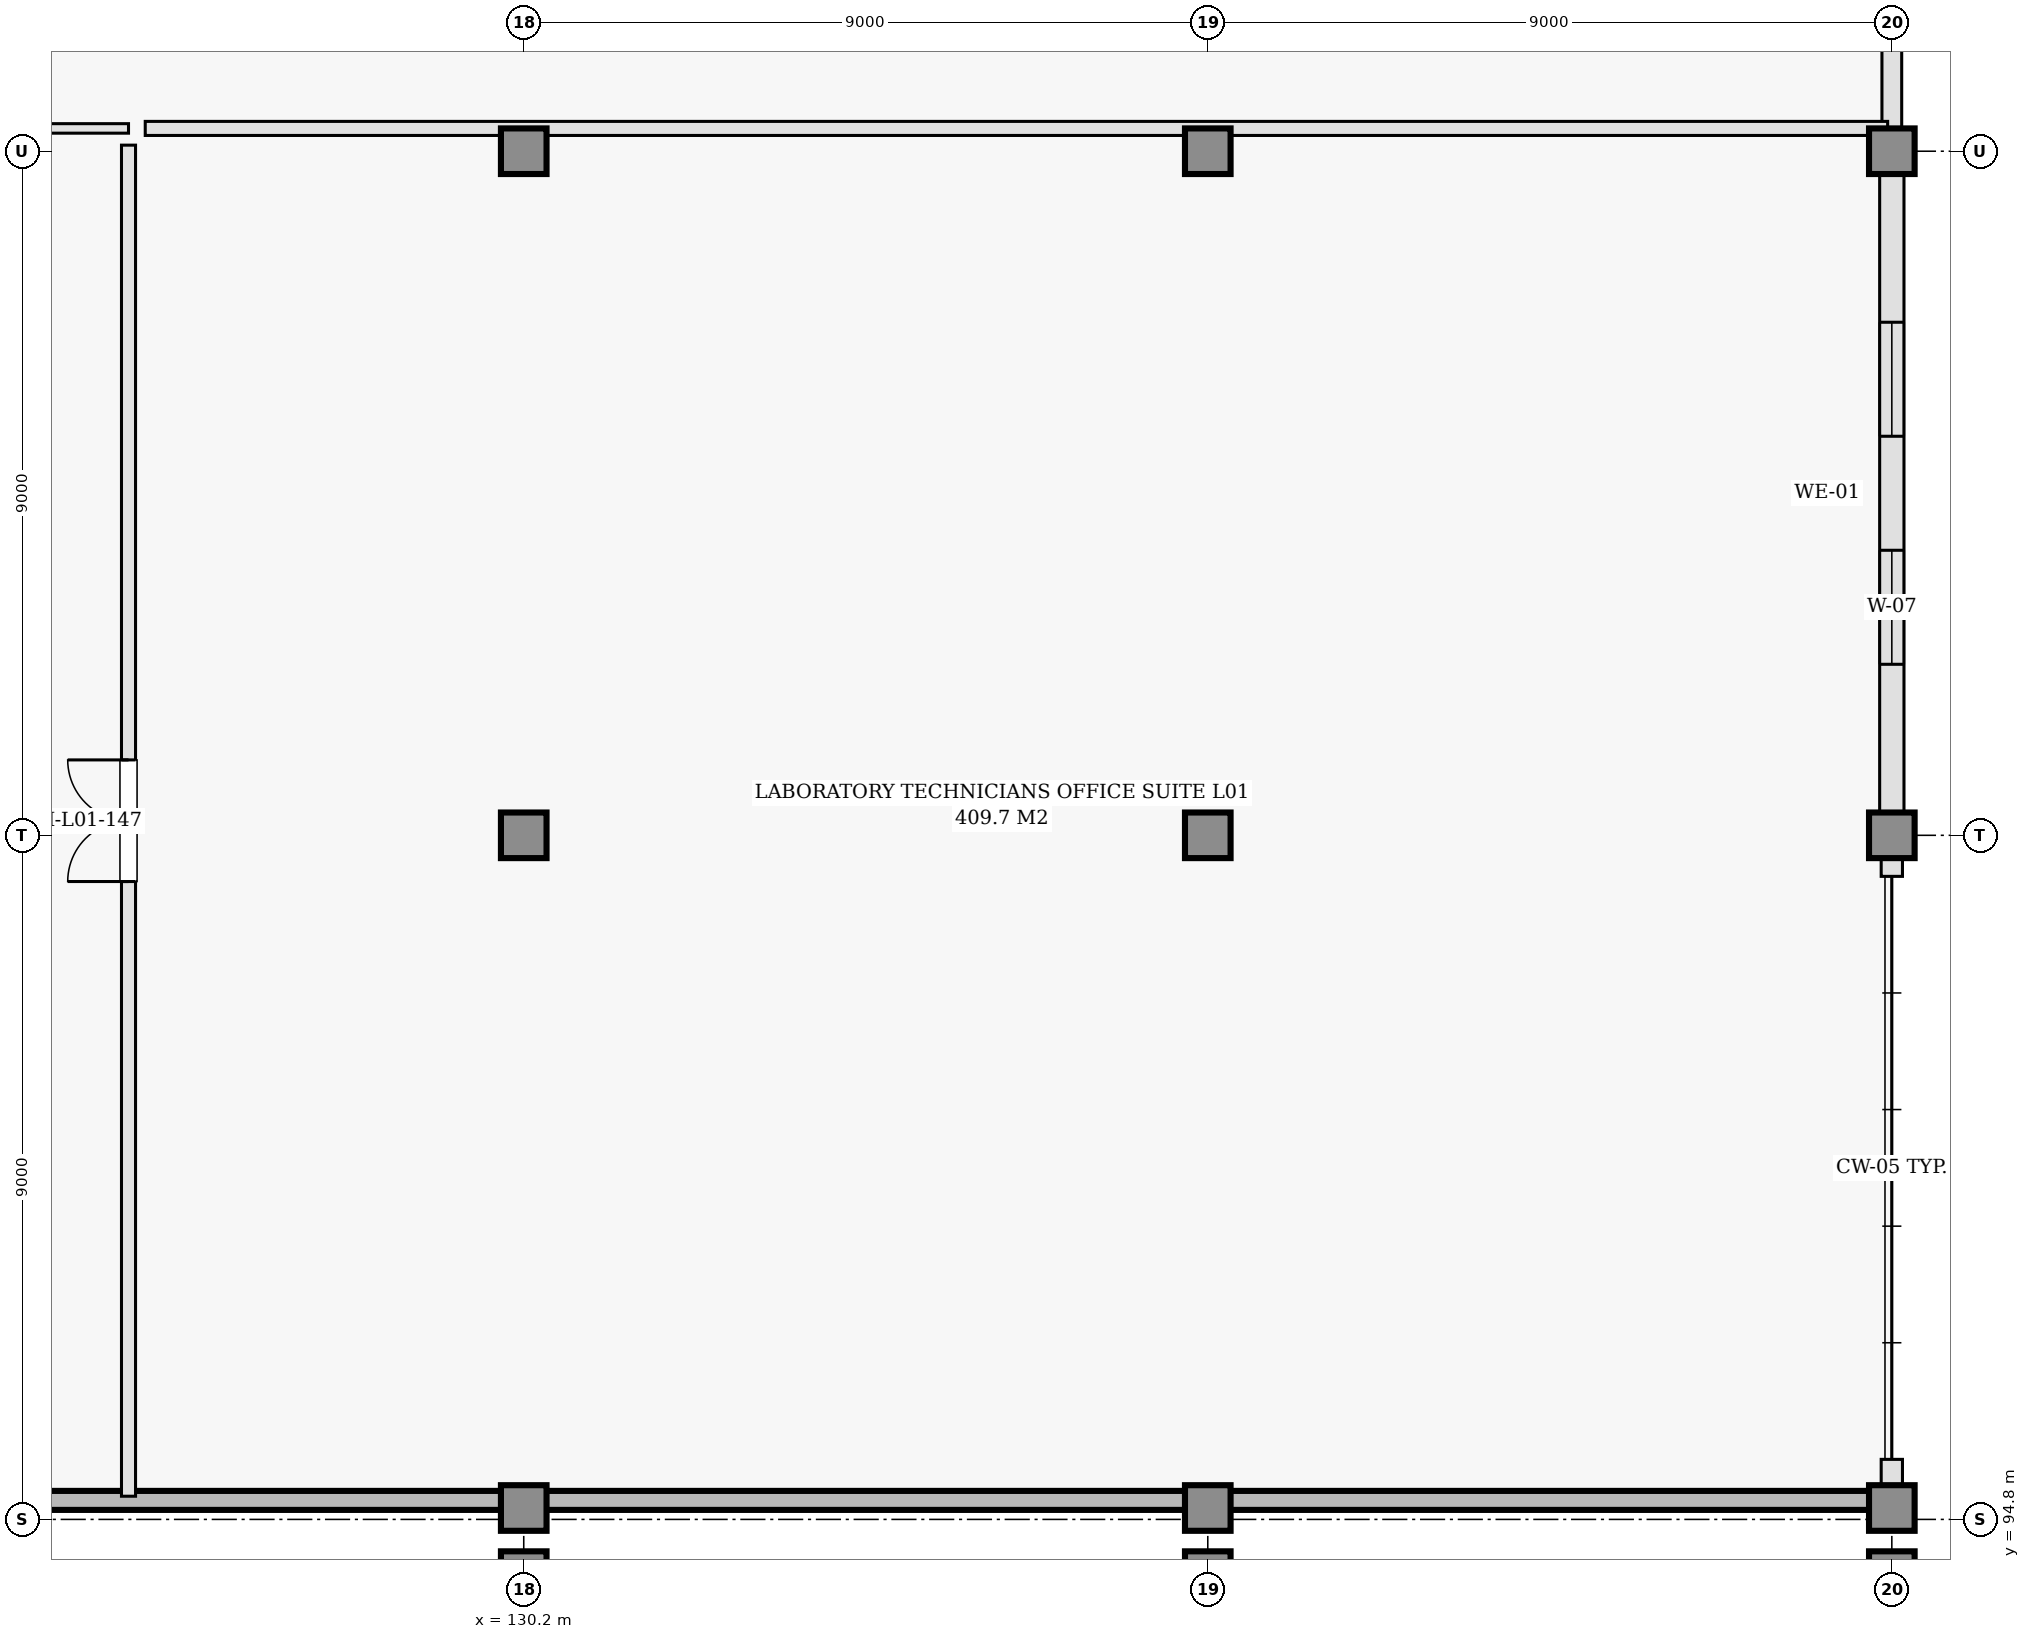
"""IFC4 building model, lengths in metres.
Left out: names, types, materials, properties, quantities, classifications, styles, units other than length and angle.
Written with IfcOpenShell. Run it as: python <this file> out.ifc"""

import sys

from ifc_helpers import new_model, si_unit, direction, frame, frame_2d, origin, origin_2d, place, context, subcontext, project, spatial, rectangle, i_section, extrude, element, fill, save


model = new_model("IFC4")
c1 = context("Model", 3, precision=1e-05, world=origin(), true_north=direction((0.0, 1.0)))
c2 = subcontext(c1, "Body", "Model", "MODEL_VIEW")
j1 = project(units=[si_unit("LENGTHUNIT", "METRE"), si_unit("PLANEANGLEUNIT", "RADIAN")], contexts=[c1])
p1 = place(None, origin())
s1 = spatial("IfcSite", under=j1, at=p1, CompositionType="ELEMENT")
p2 = place(p1, origin())
s2 = spatial("IfcBuilding", under=s1, at=p2, CompositionType="ELEMENT")
p3 = place(p2, frame((0.0, 0.0, 4.8)))
s3 = spatial("IfcBuildingStorey", under=s2, at=p3, CompositionType="ELEMENT", Elevation=4.8)
for number, where, z_axis, x_axis in (
    (1, (130.2, 94.2, 0.0), (0.0, 0.0, 1.0), (1.0, 0.0, 0.0)),
    (2, (139.2, 94.2, 0.0), (0.0, 0.0, 1.0), (1.0, 0.0, 0.0)),
    (3, (148.2, 94.2, 0.0), (0.0, 0.0, 1.0), (1.0, 0.0, 0.0)),
):
    element("IfcColumn", number, at=place(p3, frame(where, z_axis=z_axis, x_axis=x_axis)), inside=s3, PredefinedType="COLUMN", context=c2, shape_type="SweptSolid", body=[
        extrude(i_section(OverallWidth=0.3, OverallDepth=0.36, WebThickness=0.012, FlangeThickness=0.022, FilletRadius=0.027, at=origin_2d()), origin(), (0.0, 0.0, 1.0), 4.8),
    ])
for number, where, z_axis, x_axis in (
    (4, (130.2, 94.95, 0.0), (0.0, 0.0, 1.0), (1.0, 0.0, 0.0)),
    (5, (130.2, 103.8, 0.0), (0.0, 0.0, 1.0), (1.0, 0.0, 0.0)),
    (6, (130.2, 112.8, 0.0), (0.0, 0.0, 1.0), (1.0, 0.0, 0.0)),
    (7, (139.2, 94.95, 0.0), (0.0, 0.0, 1.0), (1.0, 0.0, 0.0)),
    (8, (139.2, 103.8, 0.0), (0.0, 0.0, 1.0), (1.0, 0.0, 0.0)),
    (9, (139.2, 112.8, 0.0), (0.0, 0.0, 1.0), (1.0, 0.0, 0.0)),
    (10, (148.2, 94.95, 0.0), (0.0, 0.0, 1.0), (1.0, 0.0, 0.0)),
    (11, (148.2, 103.8, 0.0), (0.0, 0.0, 1.0), (1.0, 0.0, 0.0)),
    (12, (148.2, 112.8, 0.0), (0.0, 0.0, 1.0), (1.0, 0.0, 0.0)),
):
    element("IfcColumn", number, at=place(p3, frame(where, z_axis=z_axis, x_axis=x_axis)), inside=s3, PredefinedType="COLUMN", context=c2, shape_type="SweptSolid", body=[
        extrude(rectangle(XDim=0.6, YDim=0.6, at=origin_2d()), origin(), (0.0, 0.0, 1.0), 4.8),
    ])
p4 = place(p3, frame((111.6, 95.05, 0.0), z_axis=(0.0, 0.0, 1.0), x_axis=(1.0, 0.0, 0.0)))
e13 = element("IfcWall", 13, at=p4, inside=s3, PredefinedType="SHEAR", context=c2, shape_type="SweptSolid", body=[
    extrude(rectangle(XDim=36.6, YDim=0.25, at=frame_2d((18.3, 0.0))), origin(), (0.0, 0.0, 1.0), 4.48),
])
p5 = place(p3, frame((148.2, 95.177, 0.0), z_axis=(0.0, 0.0, 1.0), x_axis=(0.0, 1.0, 0.0)))
e14 = element("IfcWall", 14, at=p5, inside=s3, PredefinedType="SOLIDWALL", context=c2, shape_type="SweptSolid", body=[
    extrude(rectangle(XDim=0.413, YDim=0.28, at=frame_2d((0.207, 0.0))), origin(), (0.0, 0.0, 1.0), 3.715),
])
p6 = place(p3, frame((148.2, 103.26, 0.0), z_axis=(0.0, 0.0, 1.0), x_axis=(0.0, 1.0, 0.0)))
e15 = element("IfcWall", 15, at=p6, inside=s3, PredefinedType="SOLIDWALL", context=c2, shape_type="SweptSolid", body=[
    extrude(rectangle(XDim=0.54, YDim=0.28, at=frame_2d((0.27, 0.0))), origin(), (0.0, 0.0, 1.0), 3.715),
])
p7 = place(p3, frame((148.2, 103.8, 0.0), z_axis=(0.0, 0.0, 1.0), x_axis=(0.0, 1.0, 0.0)))
e16 = element("IfcWall", 16, at=p7, inside=s3, PredefinedType="SOLIDWALL", context=c2, shape_type="SweptSolid", body=[
    extrude(rectangle(XDim=9.0, YDim=0.32, at=frame_2d((4.5, 0.0))), origin(), (0.0, 0.0, 1.0), 3.715),
])
p8 = place(p7, frame((2.25, 0.0, 0.95)))
e17 = element("IfcOpeningElement", 17, at=p8, cuts=e16, PredefinedType="OPENING", context=c2, shape_type="SweptSolid", body=[
    extrude(rectangle(XDim=1.5, YDim=1.65, at=frame_2d((0.75, 0.825))), frame((0.0, 0.17, 0.0), z_axis=(0.0, -1.0, 0.0), x_axis=(1.0, 0.0, 0.0)), (0.0, 0.0, 1.0), 0.34),
])
p9 = place(p7, frame((5.25, 0.0, 0.95)))
e18 = element("IfcOpeningElement", 18, at=p9, cuts=e16, PredefinedType="OPENING", context=c2, shape_type="SweptSolid", body=[
    extrude(rectangle(XDim=1.5, YDim=1.65, at=frame_2d((0.75, 0.825))), frame((0.0, 0.17, 0.0), z_axis=(0.0, -1.0, 0.0), x_axis=(1.0, 0.0, 0.0)), (0.0, 0.0, 1.0), 0.34),
])
p10 = place(p3, frame((148.2, 112.8, 0.0), z_axis=(0.0, 0.0, 1.0), x_axis=(0.0, 1.0, 0.0)))
e19 = element("IfcWall", 19, at=p10, inside=s3, PredefinedType="SOLIDWALL", context=c2, shape_type="SweptSolid", body=[
    extrude(rectangle(XDim=9.0, YDim=0.26, at=frame_2d((4.5, 0.0))), origin(), (0.0, 0.0, 1.0), 3.715),
])
p11 = place(p10, frame((4.875, 0.0, 0.95)))
e20 = element("IfcOpeningElement", 20, at=p11, cuts=e19, PredefinedType="OPENING", context=c2, shape_type="SweptSolid", body=[
    extrude(rectangle(XDim=2.25, YDim=1.8, at=frame_2d((1.125, 0.9))), frame((0.0, 0.14, 0.0), z_axis=(0.0, -1.0, 0.0), x_axis=(1.0, 0.0, 0.0)), (0.0, 0.0, 1.0), 0.28),
])
p12 = place(p3, frame((118.146, 113.1, 0.0), z_axis=(0.0, 0.0, 1.0), x_axis=(1.0, 0.0, 0.0)))
e21 = element("IfcWall", 21, at=p12, inside=s3, PredefinedType="PARTITIONING", context=c2, shape_type="SweptSolid", body=[
    extrude(rectangle(XDim=6.854, YDim=0.125, at=frame_2d((3.427, 0.0))), origin(), (0.0, 0.0, 1.0), 3.715),
])
p13 = place(p3, frame((125.0, 95.105, 0.0), z_axis=(0.0, 0.0, 1.0), x_axis=(0.0, 1.0, 0.0)))
e22 = element("IfcWall", 22, at=p13, inside=s3, PredefinedType="PARTITIONING", context=c2, shape_type="SweptSolid", body=[
    extrude(rectangle(XDim=17.775, YDim=0.185, at=frame_2d((8.887, 0.0))), origin(), (0.0, 0.0, 1.0), 3.715),
])
p14 = place(p13, frame((8.087, 0.0, 0.0)))
e23 = element("IfcOpeningElement", 23, at=p14, cuts=e22, PredefinedType="OPENING", context=c2, shape_type="SweptSolid", body=[
    extrude(rectangle(XDim=1.6, YDim=2.2, at=frame_2d((0.8, 1.1))), frame((0.0, 0.103, 0.0), z_axis=(0.0, -1.0, 0.0), x_axis=(1.0, 0.0, 0.0)), (0.0, 0.0, 1.0), 0.205),
])
p15 = place(p3, frame((125.22, 113.1, 0.0), z_axis=(0.0, 0.0, 1.0), x_axis=(1.0, 0.0, 0.0)))
e24 = element("IfcWall", 24, at=p15, inside=s3, PredefinedType="PARTITIONING", context=c2, shape_type="SweptSolid", body=[
    extrude(rectangle(XDim=22.925, YDim=0.185, at=frame_2d((11.462, 0.0))), origin(), (0.0, 0.0, 1.0), 3.715),
])
p16 = place(p8, origin())
e25 = element("IfcWindow", 25, at=p16, inside=s3, PartitioningType="DOUBLE_PANEL_VERTICAL", PredefinedType="WINDOW", context=c2, shape_type="SweptSolid", body=[
    extrude(rectangle(XDim=1.5, YDim=1.65, at=frame_2d((0.75, 0.825))), frame((0.0, 0.03, 0.0), z_axis=(0.0, -1.0, 0.0), x_axis=(1.0, 0.0, 0.0)), (0.0, 0.0, 1.0), 0.06),
])
fill(e17, e25)
p17 = place(p9, origin())
e26 = element("IfcWindow", 26, at=p17, inside=s3, PartitioningType="DOUBLE_PANEL_VERTICAL", PredefinedType="WINDOW", context=c2, shape_type="SweptSolid", body=[
    extrude(rectangle(XDim=1.5, YDim=1.65, at=frame_2d((0.75, 0.825))), frame((0.0, 0.03, 0.0), z_axis=(0.0, -1.0, 0.0), x_axis=(1.0, 0.0, 0.0)), (0.0, 0.0, 1.0), 0.06),
])
fill(e18, e26)
p18 = place(p14, origin())
e27 = element("IfcDoor", 27, at=p18, inside=s3, OperationType="DOUBLE_DOOR_SINGLE_SWING", PredefinedType="DOOR", context=c2, shape_type="SweptSolid", body=[
    extrude(rectangle(XDim=1.6, YDim=2.2, at=frame_2d((0.8, 1.1))), frame((0.0, 0.025, 0.0), z_axis=(0.0, -1.0, 0.0), x_axis=(1.0, 0.0, 0.0)), (0.0, 0.0, 1.0), 0.05),
])
fill(e23, e27)
save(model, sys.argv[1])
